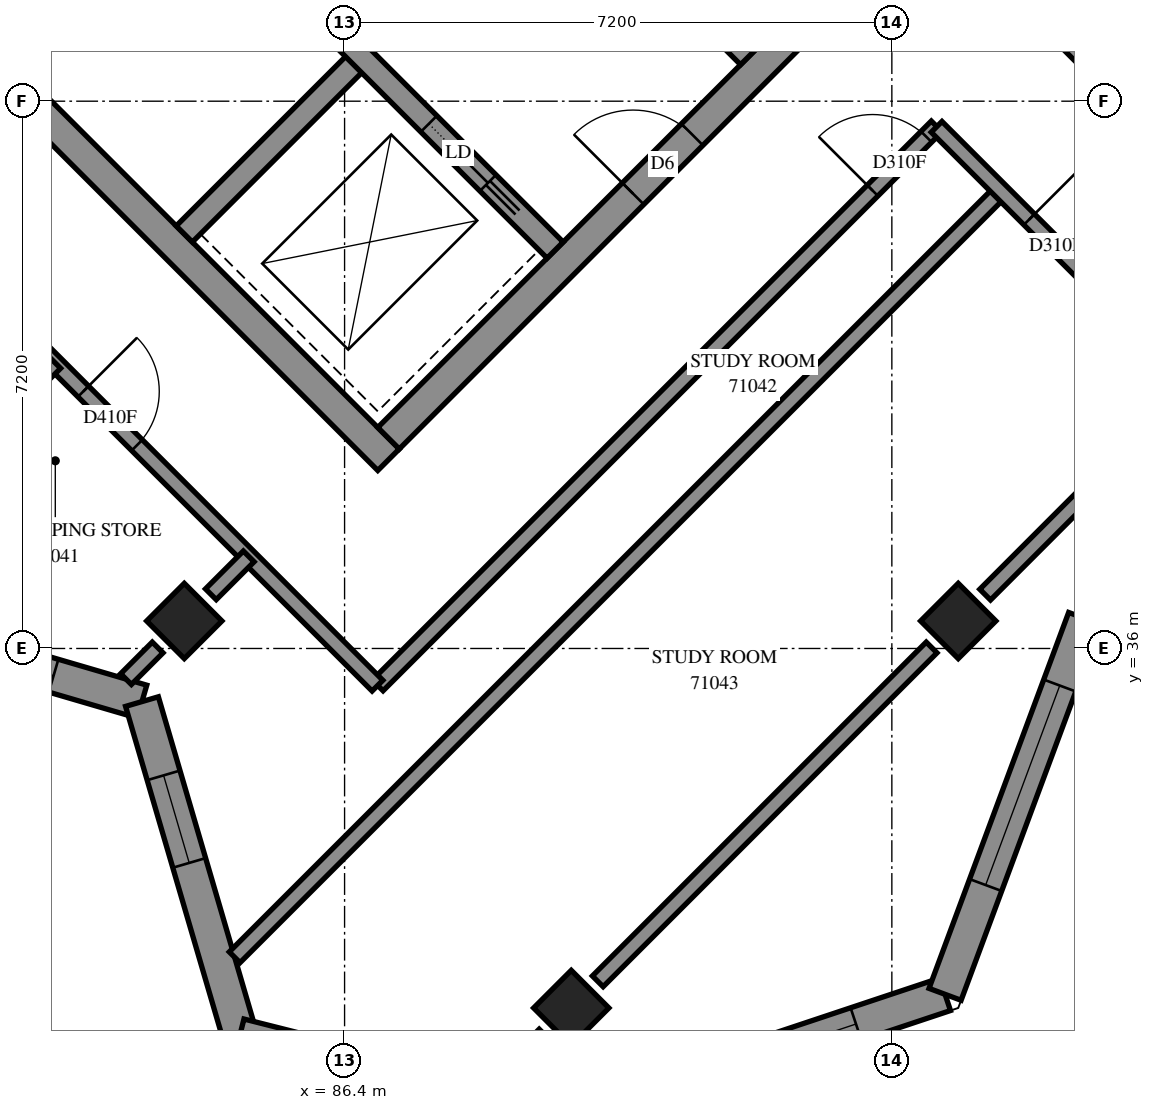
"""IFC4 building model, lengths in metres.
Left out: names, types, materials, properties, quantities, classifications, styles, units other than length and angle.
Written with IfcOpenShell. Run it as: python <this file> out.ifc"""

import sys

from ifc_helpers import new_model, si_unit, direction, frame, frame_2d, origin, origin_2d, place, context, subcontext, project, spatial, polyline, rectangle, outline, extrude, element, fill, save


model = new_model("IFC4")
c1 = context("Model", 3, precision=1e-05, world=origin(), true_north=direction((0.0, 1.0)))
c2 = subcontext(c1, "Body", "Model", "MODEL_VIEW")
j1 = project(units=[si_unit("LENGTHUNIT", "METRE"), si_unit("PLANEANGLEUNIT", "RADIAN")], contexts=[c1])
p1 = place(None, origin())
s1 = spatial("IfcSite", under=j1, at=p1, CompositionType="ELEMENT")
p2 = place(p1, origin())
s2 = spatial("IfcBuilding", under=s1, at=p2, CompositionType="ELEMENT")
p3 = place(p2, frame((0.0, 0.0, 260.8)))
s3 = spatial("IfcBuildingStorey", under=s2, at=p3, CompositionType="ELEMENT", Elevation=260.8)
for number, where, z_axis, x_axis in (
    (1, (84.291, 36.362, 0.0), (0.0, 0.0, 1.0), (0.707, -0.707, 0.0)),
    (2, (94.474, 36.362, 0.0), (0.0, 0.0, 1.0), (0.707, -0.707, 0.0)),
    (3, (89.382, 31.271, 0.0), (0.0, 0.0, 1.0), (0.707, -0.707, 0.0)),
):
    element("IfcColumn", number, at=place(p3, frame(where, z_axis=z_axis, x_axis=x_axis)), inside=s3, PredefinedType="COLUMN", context=c2, shape_type="SweptSolid", body=[
        extrude(rectangle(XDim=0.7, YDim=0.7, at=origin_2d()), origin(), (0.0, 0.0, 1.0), 3.1),
    ])
p4 = place(p3, frame((76.23, 49.231, -0.3), z_axis=(0.0, 0.0, 1.0), x_axis=(0.7071034917, -0.7071100706, 0.0)))
e4 = element("IfcWall", 4, at=p4, inside=s3, PredefinedType="SHEAR", context=c2, shape_type="SweptSolid", body=[
    extrude(rectangle(XDim=15.2, YDim=0.4, at=frame_2d((7.6, 0.0))), origin(), (0.0, 0.0, 1.0), 2.7),
])
p5 = place(p3, frame((86.978, 38.766, -0.3), z_axis=(0.0, 0.0, 1.0), x_axis=(0.7071067812, 0.7071067812, 0.0)))
e5 = element("IfcWall", 5, at=p5, inside=s3, PredefinedType="SHEAR", context=c2, shape_type="SweptSolid", body=[
    extrude(rectangle(XDim=14.4, YDim=0.4, at=frame_2d((7.2, 0.0))), origin(), (0.0, 0.0, 1.0), 2.7),
])
p6 = place(p5, frame((4.55, 0.0, 0.3)))
e6 = element("IfcOpeningElement", 6, at=p6, cuts=e5, PredefinedType="OPENING", context=c2, shape_type="SweptSolid", body=[
    extrude(rectangle(XDim=1.1, YDim=2.1, at=frame_2d((0.55, 1.05))), frame((0.0, 0.21, 0.0), z_axis=(0.0, -1.0, 0.0), x_axis=(1.0, 0.0, 0.0)), (0.0, 0.0, 1.0), 0.42),
])
p7 = place(p5, frame((11.35, 0.0, 0.3)))
e7 = element("IfcOpeningElement", 7, at=p7, cuts=e5, PredefinedType="OPENING", context=c2, shape_type="SweptSolid", body=[
    extrude(rectangle(XDim=1.1, YDim=2.1, at=frame_2d((0.55, 1.05))), frame((0.0, 0.21, 0.0), z_axis=(0.0, -1.0, 0.0), x_axis=(1.0, 0.0, 0.0)), (0.0, 0.0, 1.0), 0.42),
])
p8 = place(p3, frame((84.291, 41.453, 0.0), z_axis=(0.0, 0.0, 1.0), x_axis=(0.7071067812, 0.7071067812, 0.0)))
e8 = element("IfcWall", 8, at=p8, inside=s3, PredefinedType="SOLIDWALL", context=c2, shape_type="SweptSolid", body=[
    extrude(rectangle(XDim=3.3, YDim=0.3, at=frame_2d((1.65, 0.0))), origin(), (0.0, 0.0, 1.0), 3.1),
])
p9 = place(p3, frame((78.988, 51.423, 0.0), z_axis=(0.0, 0.0, 1.0), x_axis=(0.7071067812, -0.7071067812, 0.0)))
e9 = element("IfcWall", 9, at=p9, inside=s3, PredefinedType="SOLIDWALL", context=c2, shape_type="SweptSolid", body=[
    extrude(rectangle(XDim=14.4, YDim=0.3, at=frame_2d((7.2, 0.0))), origin(), (0.0, 0.0, 1.0), 3.1),
])
p10 = place(p9, frame((1.35, 0.0, 0.0)))
e10 = element("IfcOpeningElement", 10, at=p10, cuts=e9, PredefinedType="OPENING", context=c2, shape_type="SweptSolid", body=[
    extrude(rectangle(XDim=0.9, YDim=2.1, at=frame_2d((0.45, 1.05))), frame((0.0, 0.16, 0.0), z_axis=(0.0, -1.0, 0.0), x_axis=(1.0, 0.0, 0.0)), (0.0, 0.0, 1.0), 0.32),
])
p11 = place(p9, frame((4.95, 0.0, 0.0)))
e11 = element("IfcOpeningElement", 11, at=p11, cuts=e9, PredefinedType="OPENING", context=c2, shape_type="SweptSolid", body=[
    extrude(rectangle(XDim=0.9, YDim=2.1, at=frame_2d((0.45, 1.05))), frame((0.0, 0.16, 0.0), z_axis=(0.0, -1.0, 0.0), x_axis=(1.0, 0.0, 0.0)), (0.0, 0.0, 1.0), 0.32),
])
p12 = place(p9, frame((8.55, 0.0, 0.0)))
e12 = element("IfcOpeningElement", 12, at=p12, cuts=e9, PredefinedType="OPENING", context=c2, shape_type="SweptSolid", body=[
    extrude(rectangle(XDim=0.9, YDim=2.1, at=frame_2d((0.45, 1.05))), frame((0.0, 0.16, 0.0), z_axis=(0.0, -1.0, 0.0), x_axis=(1.0, 0.0, 0.0)), (0.0, 0.0, 1.0), 0.32),
])
p13 = place(p9, frame((12.05, 0.0, 0.0)))
e13 = element("IfcOpeningElement", 13, at=p13, cuts=e9, PredefinedType="OPENING", context=c2, shape_type="SweptSolid", body=[
    extrude(rectangle(XDim=1.1, YDim=2.1, at=frame_2d((0.55, 1.05))), frame((0.0, 0.16, 0.0), z_axis=(0.0, -1.0, 0.0), x_axis=(1.0, 0.0, 0.0)), (0.0, 0.0, 1.0), 0.32),
])
p14 = place(p3, frame((81.534, 53.969, 0.0), z_axis=(0.0, 0.0, 1.0), x_axis=(0.707103309, -0.7071102534, 0.0)))
e14 = element("IfcWall", 14, at=p14, inside=s3, PredefinedType="SOLIDWALL", context=c2, shape_type="SweptSolid", body=[
    extrude(rectangle(XDim=14.4, YDim=0.3, at=frame_2d((7.2, 0.0))), origin(), (0.0, 0.0, 1.0), 3.1),
])
p15 = place(p14, frame((8.55, 0.0, 0.0)))
e15 = element("IfcOpeningElement", 15, at=p15, cuts=e14, PredefinedType="OPENING", context=c2, shape_type="SweptSolid", body=[
    extrude(rectangle(XDim=0.9, YDim=2.1, at=frame_2d((0.45, 1.05))), frame((0.0, 0.16, 0.0), z_axis=(0.0, -1.0, 0.0), x_axis=(1.0, 0.0, 0.0)), (0.0, 0.0, 1.0), 0.32),
])
p16 = place(p14, frame((1.25, 0.0, 0.0)))
e16 = element("IfcOpeningElement", 16, at=p16, cuts=e14, PredefinedType="OPENING", context=c2, shape_type="SweptSolid", body=[
    extrude(rectangle(XDim=1.1, YDim=2.1, at=frame_2d((0.55, 1.05))), frame((0.0, 0.16, 0.0), z_axis=(0.0, -1.0, 0.0), x_axis=(1.0, 0.0, 0.0)), (0.0, 0.0, 1.0), 0.32),
])
p17 = place(p14, frame((4.85, 0.0, 0.0)))
e17 = element("IfcOpeningElement", 17, at=p17, cuts=e14, PredefinedType="OPENING", context=c2, shape_type="SweptSolid", body=[
    extrude(rectangle(XDim=1.1, YDim=2.1, at=frame_2d((0.55, 1.05))), frame((0.0, 0.16, 0.0), z_axis=(0.0, -1.0, 0.0), x_axis=(1.0, 0.0, 0.0)), (0.0, 0.0, 1.0), 0.32),
])
p18 = place(p14, frame((12.05, 0.0, 0.0)))
e18 = element("IfcOpeningElement", 18, at=p18, cuts=e14, PredefinedType="OPENING", context=c2, shape_type="SweptSolid", body=[
    extrude(rectangle(XDim=1.1, YDim=2.1, at=frame_2d((0.55, 1.05))), frame((0.0, 0.16, 0.0), z_axis=(0.0, -1.0, 0.0), x_axis=(1.0, 0.0, 0.0)), (0.0, 0.0, 1.0), 0.32),
])
p19 = place(p3, frame((89.374, 29.808, 0.0), z_axis=(0.0, 0.0, 1.0), x_axis=(0.9486871493, 0.3162162119, 0.0)))
e19 = element("IfcWall", 19, at=p19, inside=s3, PredefinedType="SOLIDWALL", context=c2, shape_type="SweptSolid", body=[
    extrude(outline(polyline([(-0.066, -0.225), (5.301, -0.225), (5.085, 0.225), (0.066, 0.225), (-0.066, -0.225)])), origin(), (0.0, 0.0, 1.0), 3.1),
])
p20 = place(p19, frame((1.158, 0.0, 0.45)))
e20 = element("IfcOpeningElement", 20, at=p20, cuts=e19, PredefinedType="OPENING", context=c2, shape_type="SweptSolid", body=[
    extrude(rectangle(XDim=2.8, YDim=2.55, at=frame_2d((1.4, 1.275))), frame((0.0, 0.235, 0.0), z_axis=(0.0, -1.0, 0.0), x_axis=(1.0, 0.0, 0.0)), (0.0, 0.0, 1.0), 0.47),
])
p21 = place(p3, frame((94.3, 31.45, 0.0), z_axis=(0.0, 0.0, 1.0), x_axis=(0.3481927166, 0.9374229739, 0.0)))
e21 = element("IfcWall", 21, at=p21, inside=s3, PredefinedType="SOLIDWALL", context=c2, shape_type="SweptSolid", body=[
    extrude(outline(polyline([(-0.108, -0.225), (5.172, -0.225), (5.379, 0.225), (0.108, 0.225), (-0.108, -0.225)])), origin(), (0.0, 0.0, 1.0), 3.1),
])
p22 = place(p21, frame((1.534, 0.0, 0.45)))
e22 = element("IfcOpeningElement", 22, at=p22, cuts=e21, PredefinedType="OPENING", context=c2, shape_type="SweptSolid", body=[
    extrude(rectangle(XDim=2.8, YDim=2.55, at=frame_2d((1.4, 1.275))), frame((0.0, 0.235, 0.0), z_axis=(0.0, -1.0, 0.0), x_axis=(1.0, 0.0, 0.0)), (0.0, 0.0, 1.0), 0.47),
])
p23 = place(p3, frame((96.137, 36.395, 0.0), z_axis=(0.0, 0.0, 1.0), x_axis=(0.937429161, 0.3481760591, 0.0)))
e23 = element("IfcWall", 23, at=p23, inside=s3, PredefinedType="SOLIDWALL", context=c2, shape_type="SweptSolid", body=[
    extrude(outline(polyline([(0.103, -0.225), (5.383, -0.225), (5.168, 0.225), (-0.103, 0.225), (0.103, -0.225)])), origin(), (0.0, 0.0, 1.0), 3.1),
])
p24 = place(p23, frame((1.651, 0.0, 0.45)))
e24 = element("IfcOpeningElement", 24, at=p24, cuts=e23, PredefinedType="OPENING", context=c2, shape_type="SweptSolid", body=[
    extrude(rectangle(XDim=2.8, YDim=2.55, at=frame_2d((1.4, 1.275))), frame((0.0, 0.235, 0.0), z_axis=(0.0, -1.0, 0.0), x_axis=(1.0, 0.0, 0.0)), (0.0, 0.0, 1.0), 0.47),
])
p25 = place(p3, frame((79.34, 36.588, 0.0), z_axis=(0.0, 0.0, 1.0), x_axis=(0.9597007783, -0.281023871, 0.0)))
e25 = element("IfcWall", 25, at=p25, inside=s3, PredefinedType="SOLIDWALL", context=c2, shape_type="SweptSolid", body=[
    extrude(outline(polyline([(-0.129, -0.225), (4.456, -0.225), (4.702, 0.225), (0.129, 0.225), (-0.129, -0.225)])), origin(), (0.0, 0.0, 1.0), 3.1),
])
p26 = place(p25, frame((0.567, 0.0, 0.45)))
e26 = element("IfcOpeningElement", 26, at=p26, cuts=e25, PredefinedType="OPENING", context=c2, shape_type="SweptSolid", body=[
    extrude(rectangle(XDim=2.8, YDim=2.55, at=frame_2d((1.4, 1.275))), frame((0.0, 0.235, 0.0), z_axis=(0.0, -1.0, 0.0), x_axis=(1.0, 0.0, 0.0)), (0.0, 0.0, 1.0), 0.47),
])
p27 = place(p3, frame((83.734, 35.301, 0.0), z_axis=(0.0, 0.0, 1.0), x_axis=(0.281023871, -0.9597007783, 0.0)))
e27 = element("IfcWall", 27, at=p27, inside=s3, PredefinedType="SOLIDWALL", context=c2, shape_type="SweptSolid", body=[
    extrude(outline(polyline([(0.123, -0.225), (4.707, -0.225), (4.45, 0.225), (-0.123, 0.225), (0.123, -0.225)])), origin(), (0.0, 0.0, 1.0), 3.1),
])
p28 = place(p27, frame((1.012, 0.0, 0.45)))
e28 = element("IfcOpeningElement", 28, at=p28, cuts=e27, PredefinedType="OPENING", context=c2, shape_type="SweptSolid", body=[
    extrude(rectangle(XDim=1.2, YDim=2.55, at=frame_2d((0.6, 1.275))), frame((0.0, 0.235, 0.0), z_axis=(0.0, -1.0, 0.0), x_axis=(1.0, 0.0, 0.0)), (0.0, 0.0, 1.0), 0.47),
])
p29 = place(p3, frame((85.021, 30.907, 0.0), z_axis=(0.0, 0.0, 1.0), x_axis=(0.9695579017, -0.2448621555, 0.0)))
e29 = element("IfcWall", 29, at=p29, inside=s3, PredefinedType="SOLIDWALL", context=c2, shape_type="SweptSolid", body=[
    extrude(outline(polyline([(-0.129, -0.225), (4.555, -0.225), (4.423, 0.225), (0.129, 0.225), (-0.129, -0.225)])), origin(), (0.0, 0.0, 1.0), 3.1),
])
p30 = place(p29, frame((2.123, 0.0, 0.45)))
e30 = element("IfcOpeningElement", 30, at=p30, cuts=e29, PredefinedType="OPENING", context=c2, shape_type="SweptSolid", body=[
    extrude(rectangle(XDim=1.2, YDim=2.55, at=frame_2d((0.6, 1.275))), frame((0.0, 0.235, 0.0), z_axis=(0.0, -1.0, 0.0), x_axis=(1.0, 0.0, 0.0)), (0.0, 0.0, 1.0), 0.47),
])
p31 = place(p3, frame((84.954, 31.938, 0.0), z_axis=(0.0, 0.0, 1.0), x_axis=(0.7071769042, 0.7070366512, 0.0)))
e31 = element("IfcWall", 31, at=p31, inside=s3, PredefinedType="PARTITIONING", context=c2, shape_type="SweptSolid", body=[
    extrude(rectangle(XDim=14.26, YDim=0.2, at=frame_2d((7.13, 0.0))), origin(), (0.0, 0.0, 1.0), 3.1),
])
p32 = place(p3, frame((86.836, 35.514, 0.0), z_axis=(0.0, 0.0, 1.0), x_axis=(0.7071067812, 0.7071067812, 0.0)))
e32 = element("IfcWall", 32, at=p32, inside=s3, PredefinedType="PARTITIONING", context=c2, shape_type="SweptSolid", body=[
    extrude(rectangle(XDim=10.4, YDim=0.2, at=frame_2d((5.2, 0.0))), origin(), (0.0, 0.0, 1.0), 3.1),
])
p33 = place(p32, frame((9.207, 0.0, 0.0)))
e33 = element("IfcOpeningElement", 33, at=p33, cuts=e32, PredefinedType="OPENING", context=c2, shape_type="SweptSolid", body=[
    extrude(rectangle(XDim=1.0, YDim=2.1, at=frame_2d((0.5, 1.05))), frame((0.0, 0.11, 0.0), z_axis=(0.0, -1.0, 0.0), x_axis=(1.0, 0.0, 0.0)), (0.0, 0.0, 1.0), 0.22),
])
p34 = place(p3, frame((80.747, 41.597, 0.0), z_axis=(0.0, 0.0, 1.0), x_axis=(0.7071067812, -0.7071067812, 0.0)))
e34 = element("IfcWall", 34, at=p34, inside=s3, PredefinedType="PARTITIONING", context=c2, shape_type="SweptSolid", body=[
    extrude(rectangle(XDim=8.607, YDim=0.2, at=frame_2d((4.303, 0.0))), origin(), (0.0, 0.0, 1.0), 3.1),
])
p35 = place(p34, frame((0.195, 0.0, 0.0)))
e35 = element("IfcOpeningElement", 35, at=p35, cuts=e34, PredefinedType="OPENING", context=c2, shape_type="SweptSolid", body=[
    extrude(rectangle(XDim=1.0, YDim=2.1, at=frame_2d((0.5, 1.05))), frame((0.0, 0.11, 0.0), z_axis=(0.0, -1.0, 0.0), x_axis=(1.0, 0.0, 0.0)), (0.0, 0.0, 1.0), 0.22),
])
p36 = place(p34, frame((3.133, 0.0, 0.0)))
e36 = element("IfcOpeningElement", 36, at=p36, cuts=e34, PredefinedType="OPENING", context=c2, shape_type="SweptSolid", body=[
    extrude(rectangle(XDim=1.0, YDim=2.1, at=frame_2d((0.5, 1.05))), frame((0.0, 0.11, 0.0), z_axis=(0.0, -1.0, 0.0), x_axis=(1.0, 0.0, 0.0)), (0.0, 0.0, 1.0), 0.22),
])
p37 = place(p3, frame((89.731, 31.621, 0.0), z_axis=(0.0, 0.0, 1.0), x_axis=(0.7071067812, 0.7071067812, 0.0)))
e37 = element("IfcWall", 37, at=p37, inside=s3, PredefinedType="PARTITIONING", context=c2, shape_type="SweptSolid", body=[
    extrude(rectangle(XDim=6.211, YDim=0.2, at=frame_2d((3.106, 0.0))), origin(), (0.0, 0.0, 1.0), 2.6),
])
p38 = place(p3, frame((95.603, 44.277, 0.0), z_axis=(0.0, 0.0, 1.0), x_axis=(0.7071067812, -0.7071067812, 0.0)))
e38 = element("IfcWall", 38, at=p38, inside=s3, PredefinedType="PARTITIONING", context=c2, shape_type="SweptSolid", body=[
    extrude(rectangle(XDim=4.797, YDim=0.2, at=frame_2d((2.398, 0.0))), origin(), (0.0, 0.0, 1.0), 3.1),
])
p39 = place(p38, frame((1.723, 0.0, 0.0)))
e39 = element("IfcOpeningElement", 39, at=p39, cuts=e38, PredefinedType="OPENING", context=c2, shape_type="SweptSolid", body=[
    extrude(rectangle(XDim=1.0, YDim=2.1, at=frame_2d((0.5, 1.05))), frame((0.0, 0.11, 0.0), z_axis=(0.0, -1.0, 0.0), x_axis=(1.0, 0.0, 0.0)), (0.0, 0.0, 1.0), 0.22),
])
p40 = place(p3, frame((94.189, 42.863, 0.0), z_axis=(0.0, 0.0, 1.0), x_axis=(0.7071067812, -0.7071067812, 0.0)))
e40 = element("IfcWall", 40, at=p40, inside=s3, PredefinedType="PARTITIONING", context=c2, shape_type="SweptSolid", body=[
    extrude(rectangle(XDim=4.797, YDim=0.2, at=frame_2d((2.398, 0.0))), origin(), (0.0, 0.0, 1.0), 3.1),
])
p41 = place(p40, frame((1.723, 0.0, 0.0)))
e41 = element("IfcOpeningElement", 41, at=p41, cuts=e40, PredefinedType="OPENING", context=c2, shape_type="SweptSolid", body=[
    extrude(rectangle(XDim=1.0, YDim=2.1, at=frame_2d((0.5, 1.05))), frame((0.0, 0.11, 0.0), z_axis=(0.0, -1.0, 0.0), x_axis=(1.0, 0.0, 0.0)), (0.0, 0.0, 1.0), 0.22),
])
p42 = place(p3, frame((79.587, 36.75, 0.0), z_axis=(0.0, 0.0, 1.0), x_axis=(0.7071185405, 0.7070950217, 0.0)))
e42 = element("IfcWall", 42, at=p42, inside=s3, PredefinedType="PARTITIONING", context=c2, shape_type="SweptSolid", body=[
    extrude(rectangle(XDim=4.252, YDim=0.2, at=frame_2d((2.126, 0.0))), origin(), (0.0, 0.0, 1.0), 3.1),
])
p43 = place(p3, frame((94.828, 36.709, 0.0), z_axis=(0.0, 0.0, 1.0), x_axis=(0.7068506295, 0.7073628401, 0.0)))
e43 = element("IfcWall", 43, at=p43, inside=s3, PredefinedType="PARTITIONING", context=c2, shape_type="SweptSolid", body=[
    extrude(rectangle(XDim=3.905, YDim=0.2, at=frame_2d((1.952, 0.0))), origin(), (0.0, 0.0, 1.0), 2.6),
])
p44 = place(p3, frame((88.397, 30.287, 0.0), z_axis=(0.0, 0.0, 1.0), x_axis=(0.7070510442, 0.7071625137, 0.0)))
e44 = element("IfcWall", 44, at=p44, inside=s3, PredefinedType="PARTITIONING", context=c2, shape_type="SweptSolid", body=[
    extrude(rectangle(XDim=0.897, YDim=0.2, at=frame_2d((0.449, 0.0))), origin(), (0.0, 0.0, 1.0), 3.1),
])
p45 = place(p3, frame((84.641, 36.713, 0.0), z_axis=(0.0, 0.0, 1.0), x_axis=(0.7071067812, 0.7071067812, 0.0)))
e45 = element("IfcWall", 45, at=p45, inside=s3, PredefinedType="PARTITIONING", context=c2, shape_type="SweptSolid", body=[
    extrude(rectangle(XDim=0.704, YDim=0.2, at=frame_2d((0.352, 0.0))), origin(), (0.0, 0.0, 1.0), 3.1),
])
p46 = place(p3, frame((83.525, 35.597, 0.0), z_axis=(0.0, 0.0, 1.0), x_axis=(0.7070217975, 0.7071917547, 0.0)))
e46 = element("IfcWall", 46, at=p46, inside=s3, PredefinedType="PARTITIONING", context=c2, shape_type="SweptSolid", body=[
    extrude(rectangle(XDim=0.588, YDim=0.2, at=frame_2d((0.294, 0.0))), origin(), (0.0, 0.0, 1.0), 3.1),
])
p47 = place(p20, origin())
e47 = element("IfcWindow", 47, at=p47, inside=s3, PartitioningType="SINGLE_PANEL", PredefinedType="WINDOW", context=c2, shape_type="SweptSolid", body=[
    extrude(rectangle(XDim=2.8, YDim=2.55, at=frame_2d((1.4, 1.275))), frame((0.0, 0.205, 0.0), z_axis=(0.0, -1.0, 0.0), x_axis=(1.0, 0.0, 0.0)), (0.0, 0.0, 1.0), 0.06),
])
fill(e20, e47)
p48 = place(p22, origin())
e48 = element("IfcWindow", 48, at=p48, inside=s3, PartitioningType="SINGLE_PANEL", PredefinedType="WINDOW", context=c2, shape_type="SweptSolid", body=[
    extrude(rectangle(XDim=2.8, YDim=2.55, at=frame_2d((1.4, 1.275))), frame((0.0, 0.205, 0.0), z_axis=(0.0, -1.0, 0.0), x_axis=(1.0, 0.0, 0.0)), (0.0, 0.0, 1.0), 0.06),
])
fill(e22, e48)
p49 = place(p26, origin())
e49 = element("IfcWindow", 49, at=p49, inside=s3, PartitioningType="SINGLE_PANEL", PredefinedType="WINDOW", context=c2, shape_type="SweptSolid", body=[
    extrude(rectangle(XDim=2.8, YDim=2.55, at=frame_2d((1.4, 1.275))), frame((0.0, 0.205, 0.0), z_axis=(0.0, -1.0, 0.0), x_axis=(1.0, 0.0, 0.0)), (0.0, 0.0, 1.0), 0.06),
])
fill(e26, e49)
p50 = place(p28, origin())
e50 = element("IfcWindow", 50, at=p50, inside=s3, PartitioningType="SINGLE_PANEL", PredefinedType="WINDOW", context=c2, shape_type="SweptSolid", body=[
    extrude(rectangle(XDim=1.2, YDim=2.55, at=frame_2d((0.6, 1.275))), frame((0.0, 0.205, 0.0), z_axis=(0.0, -1.0, 0.0), x_axis=(1.0, 0.0, 0.0)), (0.0, 0.0, 1.0), 0.06),
])
fill(e28, e50)
p51 = place(p6, origin())
e51 = element("IfcDoor", 51, at=p51, inside=s3, OperationType="DOUBLE_DOOR_SINGLE_SWING", PredefinedType="DOOR", context=c2, shape_type="SweptSolid", body=[
    extrude(rectangle(XDim=1.1, YDim=2.1, at=frame_2d((0.55, 1.05))), frame((0.0, 0.025, 0.0), z_axis=(0.0, -1.0, 0.0), x_axis=(1.0, 0.0, 0.0)), (0.0, 0.0, 1.0), 0.05),
])
fill(e6, e51)
p52 = place(p13, origin())
e52 = element("IfcDoor", 52, at=p52, inside=s3, OperationType="SLIDING_TO_RIGHT", PredefinedType="DOOR", context=c2, shape_type="SweptSolid", body=[
    extrude(rectangle(XDim=1.1, YDim=2.1, at=frame_2d((0.55, 1.05))), frame((0.0, 0.025, 0.0), z_axis=(0.0, -1.0, 0.0), x_axis=(1.0, 0.0, 0.0)), (0.0, 0.0, 1.0), 0.05),
])
fill(e13, e52)
p53 = place(p36, origin())
e53 = element("IfcDoor", 53, at=p53, inside=s3, OperationType="SINGLE_SWING_LEFT", PredefinedType="DOOR", context=c2, shape_type="SweptSolid", body=[
    extrude(rectangle(XDim=1.0, YDim=2.1, at=frame_2d((0.5, 1.05))), frame((0.0, 0.025, 0.0), z_axis=(0.0, -1.0, 0.0), x_axis=(1.0, 0.0, 0.0)), (0.0, 0.0, 1.0), 0.05),
])
fill(e36, e53)
p54 = place(p33, origin())
e54 = element("IfcDoor", 54, at=p54, inside=s3, OperationType="SINGLE_SWING_RIGHT", PredefinedType="DOOR", context=c2, shape_type="SweptSolid", body=[
    extrude(rectangle(XDim=1.0, YDim=2.1, at=frame_2d((0.5, 1.05))), frame((0.0, 0.025, 0.0), z_axis=(0.0, -1.0, 0.0), x_axis=(1.0, 0.0, 0.0)), (0.0, 0.0, 1.0), 0.05),
])
fill(e33, e54)
p55 = place(p41, origin())
e55 = element("IfcDoor", 55, at=p55, inside=s3, OperationType="SINGLE_SWING_LEFT", PredefinedType="DOOR", context=c2, shape_type="SweptSolid", body=[
    extrude(rectangle(XDim=1.0, YDim=2.1, at=frame_2d((0.5, 1.05))), frame((0.0, 0.025, 0.0), z_axis=(0.0, -1.0, 0.0), x_axis=(1.0, 0.0, 0.0)), (0.0, 0.0, 1.0), 0.05),
])
fill(e41, e55)
save(model, sys.argv[1])
